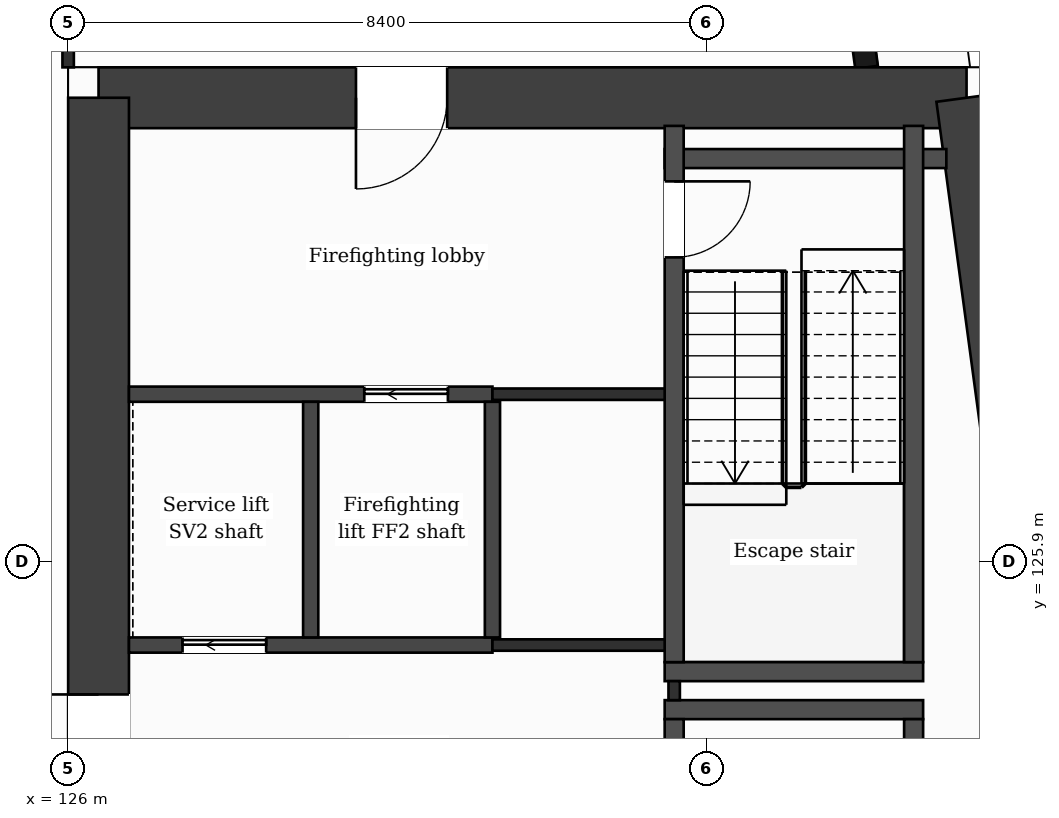
"""IFC4 building model, lengths in metres.
Left out: names, types, materials, properties, quantities, classifications, styles, units other than length and angle.
Written with IfcOpenShell. Run it as: python <this file> out.ifc"""

import sys

from ifc_helpers import new_model, si_unit, direction, frame, frame_2d, origin, place, context, subcontext, project, spatial, rectangle, extrude, element, fill, save


model = new_model("IFC4")
c1 = context("Model", 3, precision=1e-05, world=origin(), true_north=direction((0.0, 1.0)))
c2 = subcontext(c1, "Body", "Model", "MODEL_VIEW")
j1 = project(units=[si_unit("LENGTHUNIT", "METRE"), si_unit("PLANEANGLEUNIT", "RADIAN")], contexts=[c1])
p1 = place(None, origin())
s1 = spatial("IfcSite", under=j1, at=p1, CompositionType="ELEMENT")
p2 = place(p1, origin())
s2 = spatial("IfcBuilding", under=s1, at=p2, CompositionType="ELEMENT")
p3 = place(p2, frame((0.0, 0.0, 205.9)))
s3 = spatial("IfcBuildingStorey", under=s2, at=p3, CompositionType="ELEMENT", Elevation=205.9)
p4 = place(p3, frame((126.4, 132.0, 0.0), z_axis=(0.0, 0.0, 1.0), x_axis=(1.0, 0.0, 0.0)))
e1 = element("IfcWall", 1, at=p4, inside=s3, PredefinedType="SHEAR", context=c2, shape_type="SweptSolid", body=[
    extrude(rectangle(XDim=11.42, YDim=0.8, at=frame_2d((5.71, 0.0))), origin(), (0.0, 0.0, 1.0), 3.7),
])
p5 = place(p4, frame((3.386, 0.0, 0.0)))
e2 = element("IfcOpeningElement", 2, at=p5, cuts=e1, PredefinedType="OPENING", context=c2, shape_type="SweptSolid", body=[
    extrude(rectangle(XDim=1.2, YDim=2.1, at=frame_2d((0.6, 1.05))), frame((0.0, 0.41, 0.0), z_axis=(0.0, -1.0, 0.0), x_axis=(1.0, 0.0, 0.0)), (0.0, 0.0, 1.0), 0.82),
])
p6 = place(p3, frame((137.82, 132.0, 0.0), z_axis=(0.0, 0.0, 1.0), x_axis=(0.133408347329, -0.991061154956, 0.0)))
e3 = element("IfcWall", 3, at=p6, inside=s3, PredefinedType="SHEAR", context=c2, shape_type="SweptSolid", body=[
    extrude(rectangle(XDim=21.391, YDim=0.8, at=frame_2d((10.696, 0.0))), origin(), (0.0, 0.0, 1.0), 3.7),
])
p7 = place(p3, frame((126.4, 110.8, 0.0), z_axis=(0.0, 0.0, 1.0), x_axis=(0.0, 1.0, 0.0)))
e4 = element("IfcWall", 4, at=p7, inside=s3, PredefinedType="SHEAR", context=c2, shape_type="SweptSolid", body=[
    extrude(rectangle(XDim=21.2, YDim=0.8, at=frame_2d((10.6, 0.0))), origin(), (0.0, 0.0, 1.0), 3.7),
])
p8 = place(p7, frame((11.95, 0.0, 0.0)))
e5 = element("IfcOpeningElement", 5, at=p8, cuts=e4, PredefinedType="OPENING", context=c2, shape_type="SweptSolid", body=[
    extrude(rectangle(XDim=1.4, YDim=2.1, at=frame_2d((0.7, 1.05))), frame((0.0, 0.41, 0.0), z_axis=(0.0, -1.0, 0.0), x_axis=(1.0, 0.0, 0.0)), (0.0, 0.0, 1.0), 0.82),
])
p9 = place(p3, frame((136.504, 132.4, 0.0), z_axis=(0.0, 0.0, 1.0), x_axis=(-0.133399697462, 0.99106231929, 0.0)))
e6 = element("IfcWall", 6, at=p9, inside=s3, PredefinedType="SOLIDWALL", context=c2, shape_type="SweptSolid", body=[
    extrude(rectangle(XDim=6.74, YDim=0.3, at=frame_2d((3.37, 0.0))), origin(), (0.0, 0.0, 1.0), 3.38),
])
p10 = place(p9, frame((1.115, 0.0, 0.0)))
e7 = element("IfcOpeningElement", 7, at=p10, cuts=e6, PredefinedType="OPENING", context=c2, shape_type="SweptSolid", body=[
    extrude(rectangle(XDim=1.2, YDim=2.4, at=frame_2d((0.6, 1.2))), frame((0.0, 0.16, 0.0), z_axis=(0.0, -1.0, 0.0), x_axis=(1.0, 0.0, 0.0)), (0.0, 0.0, 1.0), 0.32),
])
p11 = place(p9, frame((4.436, 0.0, 0.9)))
e8 = element("IfcOpeningElement", 8, at=p11, cuts=e6, PredefinedType="OPENING", context=c2, shape_type="SweptSolid", body=[
    extrude(rectangle(XDim=1.2, YDim=2.1, at=frame_2d((0.6, 1.05))), frame((0.0, 0.16, 0.0), z_axis=(0.0, -1.0, 0.0), x_axis=(1.0, 0.0, 0.0)), (0.0, 0.0, 1.0), 0.32),
])
for number, where, z_axis, x_axis in (
    (9, (133.848, 123.95, 0.0), (0.0, 0.0, 1.0), (1.0, 0.0, 0.0)),
    (10, (133.848, 124.45, 0.0), (0.0, 0.0, 1.0), (1.0, 0.0, 0.0)),
):
    element("IfcWall", number, at=place(p3, frame(where, z_axis=z_axis, x_axis=x_axis)), inside=s3, PredefinedType="PARTITIONING", context=c2, shape_type="SweptSolid", body=[
        extrude(rectangle(XDim=3.4, YDim=0.25, at=frame_2d((1.7, 0.0))), origin(), (0.0, 0.0, 1.0), 3.38),
    ])
p12 = place(p3, frame((126.8, 124.8, 0.0), z_axis=(0.0, 0.0, 1.0), x_axis=(1.0, 0.0, 0.0)))
e11 = element("IfcWall", 11, at=p12, inside=s3, PredefinedType="PARTITIONING", context=c2, shape_type="SweptSolid", body=[
    extrude(rectangle(XDim=4.782, YDim=0.2, at=frame_2d((2.391, 0.0))), origin(), (0.0, 0.0, 1.0), 3.38),
])
p13 = place(p12, frame((0.705, 0.0, 0.0)))
e12 = element("IfcOpeningElement", 12, at=p13, cuts=e11, PredefinedType="OPENING", context=c2, shape_type="SweptSolid", body=[
    extrude(rectangle(XDim=1.1, YDim=2.1, at=frame_2d((0.55, 1.05))), frame((0.0, 0.11, 0.0), z_axis=(0.0, -1.0, 0.0), x_axis=(1.0, 0.0, 0.0)), (0.0, 0.0, 1.0), 0.22),
])
p14 = place(p3, frame((131.582, 124.8, 0.0), z_axis=(0.0, 0.0, 1.0), x_axis=(1.0, 0.0, 0.0)))
e13 = element("IfcWall", 13, at=p14, inside=s3, PredefinedType="PARTITIONING", context=c2, shape_type="SweptSolid", body=[
    extrude(rectangle(XDim=2.516, YDim=0.15, at=frame_2d((1.258, 0.0))), origin(), (0.0, 0.0, 1.0), 3.38),
])
p15 = place(p3, frame((126.8, 128.1, 0.0), z_axis=(0.0, 0.0, 1.0), x_axis=(1.0, 0.0, 0.0)))
e14 = element("IfcWall", 14, at=p15, inside=s3, PredefinedType="PARTITIONING", context=c2, shape_type="SweptSolid", body=[
    extrude(rectangle(XDim=4.782, YDim=0.2, at=frame_2d((2.391, 0.0))), origin(), (0.0, 0.0, 1.0), 3.38),
])
p16 = place(p15, frame((3.096, 0.0, 0.0)))
e15 = element("IfcOpeningElement", 15, at=p16, cuts=e14, PredefinedType="OPENING", context=c2, shape_type="SweptSolid", body=[
    extrude(rectangle(XDim=1.1, YDim=2.1, at=frame_2d((0.55, 1.05))), frame((0.0, 0.11, 0.0), z_axis=(0.0, -1.0, 0.0), x_axis=(1.0, 0.0, 0.0)), (0.0, 0.0, 1.0), 0.22),
])
p17 = place(p3, frame((131.582, 128.1, 0.0), z_axis=(0.0, 0.0, 1.0), x_axis=(1.0, 0.0, 0.0)))
e16 = element("IfcWall", 16, at=p17, inside=s3, PredefinedType="PARTITIONING", context=c2, shape_type="SweptSolid", body=[
    extrude(rectangle(XDim=2.391, YDim=0.15, at=frame_2d((1.195, 0.0))), origin(), (0.0, 0.0, 1.0), 3.38),
])
p18 = place(p3, frame((133.848, 131.2, 0.0), z_axis=(0.0, 0.0, 1.0), x_axis=(1.0, 0.0, 0.0)))
e17 = element("IfcWall", 17, at=p18, inside=s3, PredefinedType="PARTITIONING", context=c2, shape_type="SweptSolid", body=[
    extrude(rectangle(XDim=3.706, YDim=0.25, at=frame_2d((1.853, 0.0))), origin(), (0.0, 0.0, 1.0), 3.38),
])
p19 = place(p3, frame((126.0, 132.4, 0.0), z_axis=(0.0, 0.0, 1.0), x_axis=(0.0, 1.0, 0.0)))
e18 = element("IfcWall", 18, at=p19, inside=s3, PredefinedType="PARTITIONING", context=c2, shape_type="SweptSolid", body=[
    extrude(rectangle(XDim=1.325, YDim=0.15, at=frame_2d((0.663, 0.0))), origin(), (0.0, 0.0, 1.0), 3.38),
])
for number, where, z_axis, x_axis in (
    (19, (129.191, 124.9, 0.0), (0.0, 0.0, 1.0), (0.0, 1.0, 0.0)),
    (20, (131.582, 124.9, 0.0), (0.0, 0.0, 1.0), (0.0, 1.0, 0.0)),
):
    element("IfcWall", number, at=place(p3, frame(where, z_axis=z_axis, x_axis=x_axis)), inside=s3, PredefinedType="PARTITIONING", context=c2, shape_type="SweptSolid", body=[
        extrude(rectangle(XDim=3.1, YDim=0.2, at=frame_2d((1.55, 0.0))), origin(), (0.0, 0.0, 1.0), 3.38),
    ])
p20 = place(p3, frame((133.973, 124.075, 0.0), z_axis=(0.0, 0.0, 1.0), x_axis=(0.0, 1.0, 0.0)))
e21 = element("IfcWall", 21, at=p20, inside=s3, PredefinedType="PARTITIONING", context=c2, shape_type="SweptSolid", body=[
    extrude(rectangle(XDim=0.25, YDim=0.15, at=frame_2d((0.125, 0.0))), origin(), (0.0, 0.0, 1.0), 3.38),
])
p21 = place(p3, frame((133.973, 116.77, 0.0), z_axis=(0.0, 0.0, 1.0), x_axis=(0.0, 1.0, 0.0)))
e22 = element("IfcWall", 22, at=p21, inside=s3, PredefinedType="PARTITIONING", context=c2, shape_type="SweptSolid", body=[
    extrude(rectangle(XDim=7.055, YDim=0.25, at=frame_2d((3.527, 0.0))), origin(), (0.0, 0.0, 1.0), 3.38),
])
p22 = place(p21, frame((5.755, 0.0, 0.0)))
e23 = element("IfcOpeningElement", 23, at=p22, cuts=e22, PredefinedType="OPENING", context=c2, shape_type="SweptSolid", body=[
    extrude(rectangle(XDim=0.95, YDim=2.1, at=frame_2d((0.475, 1.05))), frame((0.0, 0.135, 0.0), z_axis=(0.0, -1.0, 0.0), x_axis=(1.0, 0.0, 0.0)), (0.0, 0.0, 1.0), 0.27),
])
p23 = place(p3, frame((133.973, 124.575, 0.0), z_axis=(0.0, 0.0, 1.0), x_axis=(0.0, 1.0, 0.0)))
e24 = element("IfcWall", 24, at=p23, inside=s3, PredefinedType="PARTITIONING", context=c2, shape_type="SweptSolid", body=[
    extrude(rectangle(XDim=7.055, YDim=0.25, at=frame_2d((3.527, 0.0))), origin(), (0.0, 0.0, 1.0), 3.38),
])
p24 = place(p23, frame((5.325, 0.0, 0.0)))
e25 = element("IfcOpeningElement", 25, at=p24, cuts=e24, PredefinedType="OPENING", context=c2, shape_type="SweptSolid", body=[
    extrude(rectangle(XDim=1.0, YDim=2.1, at=frame_2d((0.5, 1.05))), frame((0.0, 0.135, 0.0), z_axis=(0.0, -1.0, 0.0), x_axis=(1.0, 0.0, 0.0)), (0.0, 0.0, 1.0), 0.27),
])
for number, where, z_axis, x_axis in (
    (26, (137.123, 116.77, 0.0), (0.0, 0.0, 1.0), (0.0, 1.0, 0.0)),
    (27, (137.123, 124.575, 0.0), (0.0, 0.0, 1.0), (0.0, 1.0, 0.0)),
):
    element("IfcWall", number, at=place(p3, frame(where, z_axis=z_axis, x_axis=x_axis)), inside=s3, PredefinedType="PARTITIONING", context=c2, shape_type="SweptSolid", body=[
        extrude(rectangle(XDim=7.055, YDim=0.25, at=frame_2d((3.527, 0.0))), origin(), (0.0, 0.0, 1.0), 3.38),
    ])
p25 = place(p16, origin())
e28 = element("IfcDoor", 28, at=p25, inside=s3, OperationType="SLIDING_TO_LEFT", PredefinedType="DOOR", context=c2, shape_type="SweptSolid", body=[
    extrude(rectangle(XDim=1.1, YDim=2.1, at=frame_2d((0.55, 1.05))), frame((0.0, 0.025, 0.0), z_axis=(0.0, -1.0, 0.0), x_axis=(1.0, 0.0, 0.0)), (0.0, 0.0, 1.0), 0.05),
])
fill(e15, e28)
p26 = place(p13, origin())
e29 = element("IfcDoor", 29, at=p26, inside=s3, OperationType="SLIDING_TO_LEFT", PredefinedType="DOOR", context=c2, shape_type="SweptSolid", body=[
    extrude(rectangle(XDim=1.1, YDim=2.1, at=frame_2d((0.55, 1.05))), frame((0.0, 0.025, 0.0), z_axis=(0.0, -1.0, 0.0), x_axis=(1.0, 0.0, 0.0)), (0.0, 0.0, 1.0), 0.05),
])
fill(e12, e29)
p27 = place(p24, origin())
e30 = element("IfcDoor", 30, at=p27, inside=s3, OperationType="SINGLE_SWING_RIGHT", PredefinedType="DOOR", context=c2, shape_type="SweptSolid", body=[
    extrude(rectangle(XDim=1.0, YDim=2.1, at=frame_2d((0.5, 1.05))), frame((0.0, 0.025, 0.0), z_axis=(0.0, -1.0, 0.0), x_axis=(1.0, 0.0, 0.0)), (0.0, 0.0, 1.0), 0.05),
])
fill(e25, e30)
p28 = place(p5, origin())
e31 = element("IfcDoor", 31, at=p28, inside=s3, OperationType="SINGLE_SWING_LEFT", PredefinedType="DOOR", context=c2, shape_type="SweptSolid", body=[
    extrude(rectangle(XDim=1.2, YDim=2.1, at=frame_2d((0.6, 1.05))), frame((0.0, 0.025, 0.0), z_axis=(0.0, -1.0, 0.0), x_axis=(1.0, 0.0, 0.0)), (0.0, 0.0, 1.0), 0.05),
])
fill(e2, e31)
p29 = place(p8, origin())
e32 = element("IfcDoor", 32, at=p29, inside=s3, OperationType="SINGLE_SWING_RIGHT", PredefinedType="DOOR", context=c2, shape_type="SweptSolid", body=[
    extrude(rectangle(XDim=1.4, YDim=2.1, at=frame_2d((0.7, 1.05))), frame((0.0, 0.025, 0.0), z_axis=(0.0, -1.0, 0.0), x_axis=(1.0, 0.0, 0.0)), (0.0, 0.0, 1.0), 0.05),
])
fill(e5, e32)
save(model, sys.argv[1])
